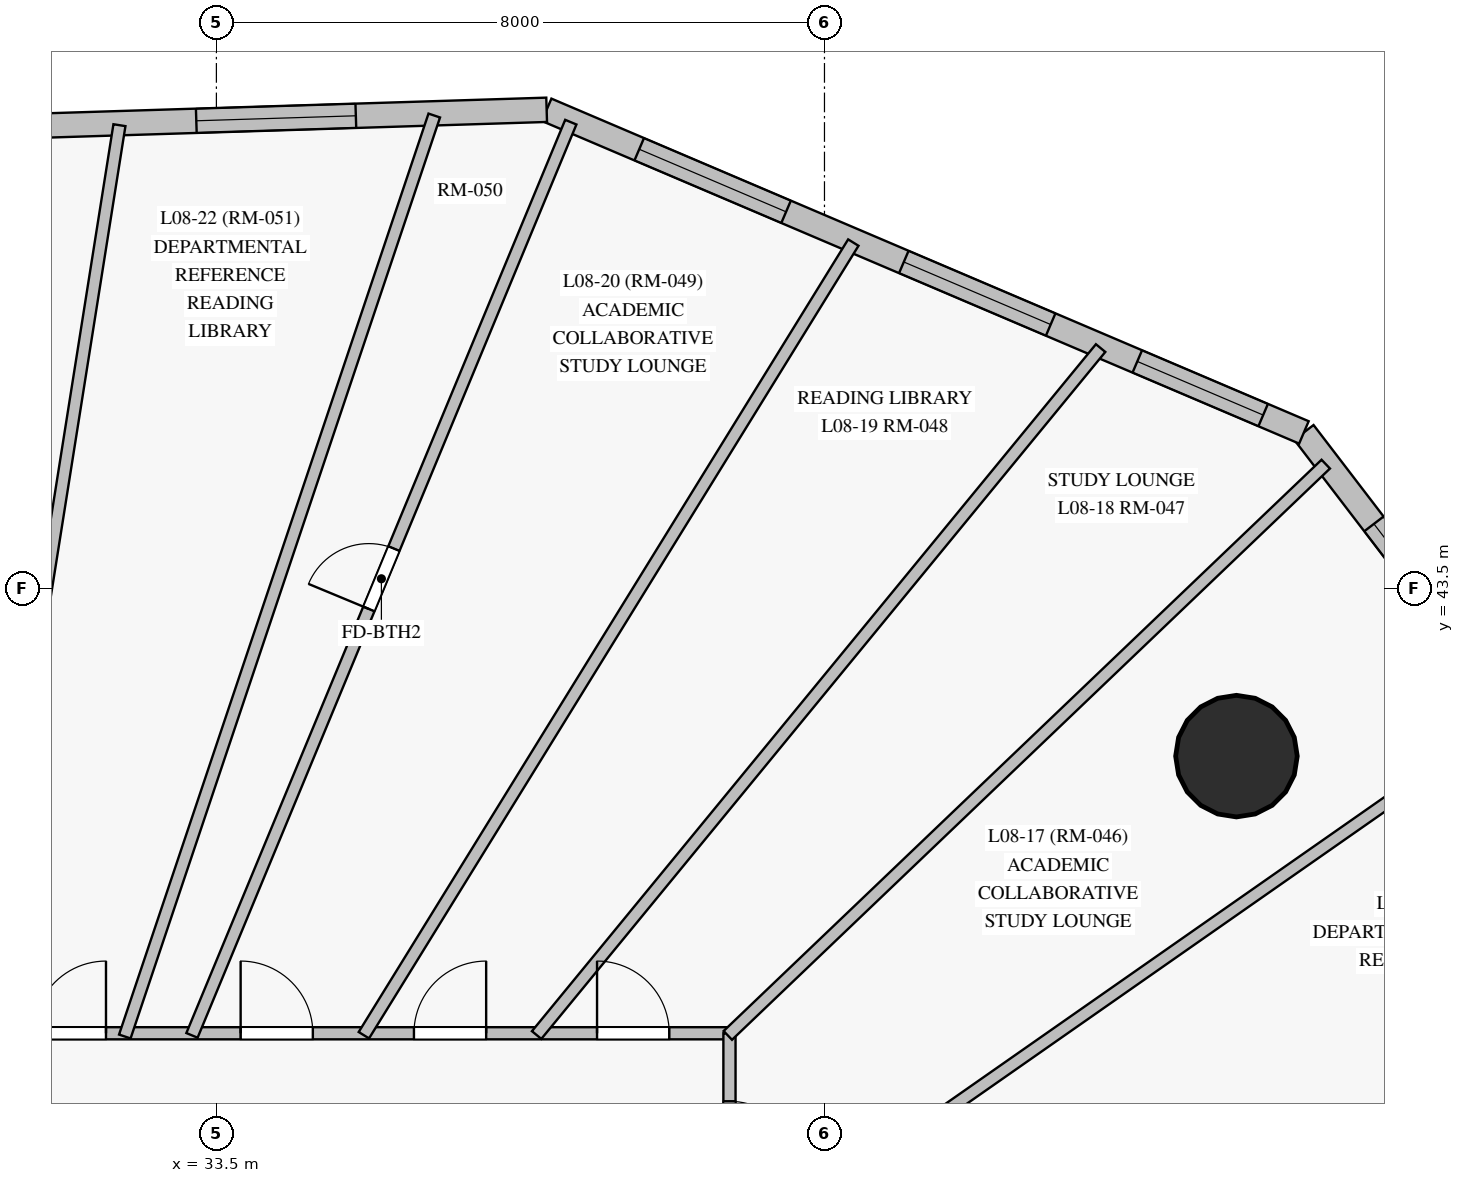
"""IFC4 building model, lengths in metres.
Left out: names, types, materials, properties, quantities, classifications, styles, units other than length and angle.
Written with IfcOpenShell. Run it as: python <this file> out.ifc"""

import sys

from ifc_helpers import new_model, si_unit, direction, frame, frame_2d, origin, origin_with_axes, origin_2d, place, context, subcontext, project, spatial, rectangle, circle, extrude, source, transform, mapped, element, fill, save


model = new_model("IFC4")
c1 = context("Model", 3, precision=1e-05, world=origin(), true_north=direction((0.0, 1.0)))
c2 = subcontext(c1, "Body", "Model", "MODEL_VIEW")
j1 = project(units=[si_unit("LENGTHUNIT", "METRE"), si_unit("PLANEANGLEUNIT", "RADIAN")], contexts=[c1])
p1 = place(None, origin())
s1 = spatial("IfcSite", under=j1, at=p1, CompositionType="ELEMENT")
p2 = place(p1, origin())
s2 = spatial("IfcBuilding", under=s1, at=p2, CompositionType="ELEMENT")
p3 = place(p2, frame((0.0, 0.0, 33.7)))
s3 = spatial("IfcBuildingStorey", under=s2, at=p3, CompositionType="ELEMENT", Elevation=33.7)
m1 = source(origin_with_axes(), c2, "Body", "SweptSolid", [
    extrude(circle(Radius=0.8, at=origin_2d()), origin(), (0.0, 0.0, 1.0), 3.6),
])
p4 = place(p3, frame((46.92, 41.296, 0.0), z_axis=(0.0, 0.0, 1.0), x_axis=(1.0, 0.0, 0.0)))
e1 = element("IfcColumn", 1, at=p4, inside=s3, PredefinedType="COLUMN", context=c2, shape_type="MappedRepresentation", body=[
    mapped(m1, transform((0.0, 0.0, 0.0), scale=1.0)),
])
p5 = place(p3, frame((55.98, 34.879, 0.0), z_axis=(0.0, 0.0, 1.0), x_axis=(-0.607853082848, 0.794049513363, 0.0)))
e2 = element("IfcWall", 2, at=p5, inside=s3, PredefinedType="SOLIDWALL", context=c2, shape_type="SweptSolid", body=[
    extrude(rectangle(XDim=13.445, YDim=0.32, at=frame_2d((6.723, 0.0))), origin(), (0.0, 0.0, 1.0), 3.35),
])
p6 = place(p5, frame((1.679, 0.0, 0.85)))
e3 = element("IfcOpeningElement", 3, at=p6, cuts=e2, PredefinedType="OPENING", context=c2, shape_type="SweptSolid", body=[
    extrude(rectangle(XDim=2.1, YDim=1.95, at=frame_2d((1.05, 0.975))), frame((0.0, 0.17, 0.0), z_axis=(0.0, -1.0, 0.0), x_axis=(1.0, 0.0, 0.0)), (0.0, 0.0, 1.0), 0.34),
])
p7 = place(p5, frame((5.772, 0.0, 0.85)))
e4 = element("IfcOpeningElement", 4, at=p7, cuts=e2, PredefinedType="OPENING", context=c2, shape_type="SweptSolid", body=[
    extrude(rectangle(XDim=2.1, YDim=1.95, at=frame_2d((1.05, 0.975))), frame((0.0, 0.17, 0.0), z_axis=(0.0, -1.0, 0.0), x_axis=(1.0, 0.0, 0.0)), (0.0, 0.0, 1.0), 0.34),
])
p8 = place(p5, frame((9.83, 0.0, 0.85)))
e5 = element("IfcOpeningElement", 5, at=p8, cuts=e2, PredefinedType="OPENING", context=c2, shape_type="SweptSolid", body=[
    extrude(rectangle(XDim=2.1, YDim=1.95, at=frame_2d((1.05, 0.975))), frame((0.0, 0.17, 0.0), z_axis=(0.0, -1.0, 0.0), x_axis=(1.0, 0.0, 0.0)), (0.0, 0.0, 1.0), 0.34),
])
p9 = place(p3, frame((47.807, 45.555, 0.0), z_axis=(0.0, 0.0, 1.0), x_axis=(-0.919989506937, 0.391942989637, 0.0)))
e6 = element("IfcWall", 6, at=p9, inside=s3, PredefinedType="SOLIDWALL", context=c2, shape_type="SweptSolid", body=[
    extrude(rectangle(XDim=10.829, YDim=0.32, at=frame_2d((5.415, 0.0))), origin(), (0.0, 0.0, 1.0), 3.35),
])
p10 = place(p9, frame((0.583, 0.0, 0.85)))
e7 = element("IfcOpeningElement", 7, at=p10, cuts=e6, PredefinedType="OPENING", context=c2, shape_type="SweptSolid", body=[
    extrude(rectangle(XDim=1.8, YDim=1.85, at=frame_2d((0.9, 0.925))), frame((0.0, 0.17, 0.0), z_axis=(0.0, -1.0, 0.0), x_axis=(1.0, 0.0, 0.0)), (0.0, 0.0, 1.0), 0.34),
])
p11 = place(p9, frame((3.621, 0.0, 0.85)))
e8 = element("IfcOpeningElement", 8, at=p11, cuts=e6, PredefinedType="OPENING", context=c2, shape_type="SweptSolid", body=[
    extrude(rectangle(XDim=2.1, YDim=1.95, at=frame_2d((1.05, 0.975))), frame((0.0, 0.17, 0.0), z_axis=(0.0, -1.0, 0.0), x_axis=(1.0, 0.0, 0.0)), (0.0, 0.0, 1.0), 0.34),
])
p12 = place(p9, frame((7.405, 0.0, 0.85)))
e9 = element("IfcOpeningElement", 9, at=p12, cuts=e6, PredefinedType="OPENING", context=c2, shape_type="SweptSolid", body=[
    extrude(rectangle(XDim=2.1, YDim=1.95, at=frame_2d((1.05, 0.975))), frame((0.0, 0.17, 0.0), z_axis=(0.0, -1.0, 0.0), x_axis=(1.0, 0.0, 0.0)), (0.0, 0.0, 1.0), 0.34),
])
p13 = place(p3, frame((37.845, 49.799, 0.0), z_axis=(0.0, 0.0, 1.0), x_axis=(-0.999508801206, -0.031339373191, 0.0)))
e10 = element("IfcWall", 10, at=p13, inside=s3, PredefinedType="SOLIDWALL", context=c2, shape_type="SweptSolid", body=[
    extrude(rectangle(XDim=15.736, YDim=0.32, at=frame_2d((7.868, 0.0))), origin(), (0.0, 0.0, 1.0), 3.35),
])
p14 = place(p13, frame((2.511, 0.0, 0.85)))
e11 = element("IfcOpeningElement", 11, at=p14, cuts=e10, PredefinedType="OPENING", context=c2, shape_type="SweptSolid", body=[
    extrude(rectangle(XDim=2.1, YDim=1.95, at=frame_2d((1.05, 0.975))), frame((0.0, 0.17, 0.0), z_axis=(0.0, -1.0, 0.0), x_axis=(1.0, 0.0, 0.0)), (0.0, 0.0, 1.0), 0.34),
])
p15 = place(p13, frame((7.155, 0.0, 0.85)))
e12 = element("IfcOpeningElement", 12, at=p15, cuts=e10, PredefinedType="OPENING", context=c2, shape_type="SweptSolid", body=[
    extrude(rectangle(XDim=2.1, YDim=1.95, at=frame_2d((1.05, 0.975))), frame((0.0, 0.17, 0.0), z_axis=(0.0, -1.0, 0.0), x_axis=(1.0, 0.0, 0.0)), (0.0, 0.0, 1.0), 0.34),
])
p16 = place(p13, frame((11.572, 0.0, 0.85)))
e13 = element("IfcOpeningElement", 13, at=p16, cuts=e10, PredefinedType="OPENING", context=c2, shape_type="SweptSolid", body=[
    extrude(rectangle(XDim=2.1, YDim=1.95, at=frame_2d((1.05, 0.975))), frame((0.0, 0.17, 0.0), z_axis=(0.0, -1.0, 0.0), x_axis=(1.0, 0.0, 0.0)), (0.0, 0.0, 1.0), 0.34),
])
p17 = place(p3, frame((10.5, 37.65, 0.0), z_axis=(0.0, 0.0, 1.0), x_axis=(1.0, 0.0, 0.0)))
e14 = element("IfcWall", 14, at=p17, inside=s3, PredefinedType="PARTITIONING", context=c2, shape_type="SweptSolid", body=[
    extrude(rectangle(XDim=29.75, YDim=0.16, at=frame_2d((14.875, 0.0))), origin(), (0.0, 0.0, 1.0), 2.75),
])
p18 = place(p17, frame((28.008, 0.0, 0.0)))
e15 = element("IfcOpeningElement", 15, at=p18, cuts=e14, PredefinedType="OPENING", context=c2, shape_type="SweptSolid", body=[
    extrude(rectangle(XDim=0.95, YDim=2.15, at=frame_2d((0.475, 1.075))), frame((0.0, 0.09, 0.0), z_axis=(0.0, -1.0, 0.0), x_axis=(1.0, 0.0, 0.0)), (0.0, 0.0, 1.0), 0.18),
])
p19 = place(p17, frame((25.599, 0.0, 0.0)))
e16 = element("IfcOpeningElement", 16, at=p19, cuts=e14, PredefinedType="OPENING", context=c2, shape_type="SweptSolid", body=[
    extrude(rectangle(XDim=0.95, YDim=2.15, at=frame_2d((0.475, 1.075))), frame((0.0, 0.09, 0.0), z_axis=(0.0, -1.0, 0.0), x_axis=(1.0, 0.0, 0.0)), (0.0, 0.0, 1.0), 0.18),
])
p20 = place(p17, frame((23.319, 0.0, 0.0)))
e17 = element("IfcOpeningElement", 17, at=p20, cuts=e14, PredefinedType="OPENING", context=c2, shape_type="SweptSolid", body=[
    extrude(rectangle(XDim=0.95, YDim=2.15, at=frame_2d((0.475, 1.075))), frame((0.0, 0.09, 0.0), z_axis=(0.0, -1.0, 0.0), x_axis=(1.0, 0.0, 0.0)), (0.0, 0.0, 1.0), 0.18),
])
p21 = place(p17, frame((20.597, 0.0, 0.0)))
e18 = element("IfcOpeningElement", 18, at=p21, cuts=e14, PredefinedType="OPENING", context=c2, shape_type="SweptSolid", body=[
    extrude(rectangle(XDim=0.95, YDim=2.15, at=frame_2d((0.475, 1.075))), frame((0.0, 0.09, 0.0), z_axis=(0.0, -1.0, 0.0), x_axis=(1.0, 0.0, 0.0)), (0.0, 0.0, 1.0), 0.18),
])
p22 = place(p17, frame((18.611, 0.0, 0.0)))
e19 = element("IfcOpeningElement", 19, at=p22, cuts=e14, PredefinedType="OPENING", context=c2, shape_type="SweptSolid", body=[
    extrude(rectangle(XDim=0.95, YDim=2.15, at=frame_2d((0.475, 1.075))), frame((0.0, 0.09, 0.0), z_axis=(0.0, -1.0, 0.0), x_axis=(1.0, 0.0, 0.0)), (0.0, 0.0, 1.0), 0.18),
])
p23 = place(p17, frame((16.123, 0.0, 0.0)))
e20 = element("IfcOpeningElement", 20, at=p23, cuts=e14, PredefinedType="OPENING", context=c2, shape_type="SweptSolid", body=[
    extrude(rectangle(XDim=0.95, YDim=2.15, at=frame_2d((0.475, 1.075))), frame((0.0, 0.09, 0.0), z_axis=(0.0, -1.0, 0.0), x_axis=(1.0, 0.0, 0.0)), (0.0, 0.0, 1.0), 0.18),
])
p24 = place(p17, frame((12.996, 0.0, 0.0)))
e21 = element("IfcOpeningElement", 21, at=p24, cuts=e14, PredefinedType="OPENING", context=c2, shape_type="SweptSolid", body=[
    extrude(rectangle(XDim=0.95, YDim=2.15, at=frame_2d((0.475, 1.075))), frame((0.0, 0.09, 0.0), z_axis=(0.0, -1.0, 0.0), x_axis=(1.0, 0.0, 0.0)), (0.0, 0.0, 1.0), 0.18),
])
p25 = place(p17, frame((10.46, 0.0, 0.0)))
e22 = element("IfcOpeningElement", 22, at=p25, cuts=e14, PredefinedType="OPENING", context=c2, shape_type="SweptSolid", body=[
    extrude(rectangle(XDim=0.95, YDim=2.15, at=frame_2d((0.475, 1.075))), frame((0.0, 0.09, 0.0), z_axis=(0.0, -1.0, 0.0), x_axis=(1.0, 0.0, 0.0)), (0.0, 0.0, 1.0), 0.18),
])
p26 = place(p17, frame((7.876, 0.0, 0.0)))
e23 = element("IfcOpeningElement", 23, at=p26, cuts=e14, PredefinedType="OPENING", context=c2, shape_type="SweptSolid", body=[
    extrude(rectangle(XDim=0.95, YDim=2.15, at=frame_2d((0.475, 1.075))), frame((0.0, 0.09, 0.0), z_axis=(0.0, -1.0, 0.0), x_axis=(1.0, 0.0, 0.0)), (0.0, 0.0, 1.0), 0.18),
])
p27 = place(p17, frame((6.748, 0.0, 0.0)))
e24 = element("IfcOpeningElement", 24, at=p27, cuts=e14, PredefinedType="OPENING", context=c2, shape_type="SweptSolid", body=[
    extrude(rectangle(XDim=0.95, YDim=2.15, at=frame_2d((0.475, 1.075))), frame((0.0, 0.09, 0.0), z_axis=(0.0, -1.0, 0.0), x_axis=(1.0, 0.0, 0.0)), (0.0, 0.0, 1.0), 0.18),
])
p28 = place(p17, frame((5.623, 0.0, 0.0)))
e25 = element("IfcOpeningElement", 25, at=p28, cuts=e14, PredefinedType="OPENING", context=c2, shape_type="SweptSolid", body=[
    extrude(rectangle(XDim=0.95, YDim=2.15, at=frame_2d((0.475, 1.075))), frame((0.0, 0.09, 0.0), z_axis=(0.0, -1.0, 0.0), x_axis=(1.0, 0.0, 0.0)), (0.0, 0.0, 1.0), 0.18),
])
p29 = place(p3, frame((40.25, 37.65, 0.0), z_axis=(0.0, 0.0, 1.0), x_axis=(0.0, -1.0, 0.0)))
e26 = element("IfcWall", 26, at=p29, inside=s3, PredefinedType="PARTITIONING", context=c2, shape_type="SweptSolid", body=[
    extrude(rectangle(XDim=22.3, YDim=0.16, at=frame_2d((11.15, 0.0))), origin(), (0.0, 0.0, 1.0), 2.75),
])
p30 = place(p29, frame((16.25, 0.0, 0.0)))
e27 = element("IfcOpeningElement", 27, at=p30, cuts=e26, PredefinedType="OPENING", context=c2, shape_type="SweptSolid", body=[
    extrude(rectangle(XDim=0.95, YDim=2.15, at=frame_2d((0.475, 1.075))), frame((0.0, 0.09, 0.0), z_axis=(0.0, -1.0, 0.0), x_axis=(1.0, 0.0, 0.0)), (0.0, 0.0, 1.0), 0.18),
])
p31 = place(p29, frame((14.02, 0.0, 0.0)))
e28 = element("IfcOpeningElement", 28, at=p31, cuts=e26, PredefinedType="OPENING", context=c2, shape_type="SweptSolid", body=[
    extrude(rectangle(XDim=0.95, YDim=2.15, at=frame_2d((0.475, 1.075))), frame((0.0, 0.09, 0.0), z_axis=(0.0, -1.0, 0.0), x_axis=(1.0, 0.0, 0.0)), (0.0, 0.0, 1.0), 0.18),
])
p32 = place(p29, frame((11.165, 0.0, 0.0)))
e29 = element("IfcOpeningElement", 29, at=p32, cuts=e26, PredefinedType="OPENING", context=c2, shape_type="SweptSolid", body=[
    extrude(rectangle(XDim=0.95, YDim=2.15, at=frame_2d((0.475, 1.075))), frame((0.0, 0.09, 0.0), z_axis=(0.0, -1.0, 0.0), x_axis=(1.0, 0.0, 0.0)), (0.0, 0.0, 1.0), 0.18),
])
p33 = place(p29, frame((9.341, 0.0, 0.0)))
e30 = element("IfcOpeningElement", 30, at=p33, cuts=e26, PredefinedType="OPENING", context=c2, shape_type="SweptSolid", body=[
    extrude(rectangle(XDim=0.95, YDim=2.15, at=frame_2d((0.475, 1.075))), frame((0.0, 0.09, 0.0), z_axis=(0.0, -1.0, 0.0), x_axis=(1.0, 0.0, 0.0)), (0.0, 0.0, 1.0), 0.18),
])
p34 = place(p29, frame((7.62, 0.0, 0.0)))
e31 = element("IfcOpeningElement", 31, at=p34, cuts=e26, PredefinedType="OPENING", context=c2, shape_type="SweptSolid", body=[
    extrude(rectangle(XDim=0.95, YDim=2.15, at=frame_2d((0.475, 1.075))), frame((0.0, 0.09, 0.0), z_axis=(0.0, -1.0, 0.0), x_axis=(1.0, 0.0, 0.0)), (0.0, 0.0, 1.0), 0.18),
])
p35 = place(p29, frame((5.59, 0.0, 0.0)))
e32 = element("IfcOpeningElement", 32, at=p35, cuts=e26, PredefinedType="OPENING", context=c2, shape_type="SweptSolid", body=[
    extrude(rectangle(XDim=0.95, YDim=2.15, at=frame_2d((0.475, 1.075))), frame((0.0, 0.09, 0.0), z_axis=(0.0, -1.0, 0.0), x_axis=(1.0, 0.0, 0.0)), (0.0, 0.0, 1.0), 0.18),
])
p36 = place(p29, frame((3.591, 0.0, 0.0)))
e33 = element("IfcOpeningElement", 33, at=p36, cuts=e26, PredefinedType="OPENING", context=c2, shape_type="SweptSolid", body=[
    extrude(rectangle(XDim=0.95, YDim=2.15, at=frame_2d((0.475, 1.075))), frame((0.0, 0.09, 0.0), z_axis=(0.0, -1.0, 0.0), x_axis=(1.0, 0.0, 0.0)), (0.0, 0.0, 1.0), 0.18),
])
p37 = place(p29, frame((0.895, 0.0, 0.0)))
e34 = element("IfcOpeningElement", 34, at=p37, cuts=e26, PredefinedType="OPENING", context=c2, shape_type="SweptSolid", body=[
    extrude(rectangle(XDim=0.95, YDim=2.15, at=frame_2d((0.475, 1.075))), frame((0.0, 0.09, 0.0), z_axis=(0.0, -1.0, 0.0), x_axis=(1.0, 0.0, 0.0)), (0.0, 0.0, 1.0), 0.18),
])
p38 = place(p3, frame((40.223, 32.287, 0.0), z_axis=(0.0, 0.0, 1.0), x_axis=(0.894645323944, 0.44677706336, 0.0)))
e35 = element("IfcWall", 35, at=p38, inside=s3, PredefinedType="PARTITIONING", context=c2, shape_type="SweptSolid", body=[
    extrude(rectangle(XDim=14.319, YDim=0.16, at=frame_2d((7.16, 0.0))), origin(), (0.0, 0.0, 1.0), 3.35),
])
p39 = place(p3, frame((33.179, 37.622, 0.0), z_axis=(0.0, 0.0, 1.0), x_axis=(0.383172838405, 0.923676661992, 0.0)))
e36 = element("IfcWall", 36, at=p39, inside=s3, PredefinedType="PARTITIONING", context=c2, shape_type="SweptSolid", body=[
    extrude(rectangle(XDim=13.007, YDim=0.16, at=frame_2d((6.503, 0.0))), origin(), (0.0, 0.0, 1.0), 3.35),
])
p40 = place(p39, frame((6.073, 0.0, 0.0)))
e37 = element("IfcOpeningElement", 37, at=p40, cuts=e36, PredefinedType="OPENING", context=c2, shape_type="SweptSolid", body=[
    extrude(rectangle(XDim=0.86, YDim=2.04, at=frame_2d((0.43, 1.02))), frame((0.0, 0.09, 0.0), z_axis=(0.0, -1.0, 0.0), x_axis=(1.0, 0.0, 0.0)), (0.0, 0.0, 1.0), 0.18),
])
p41 = place(p3, frame((32.295, 37.607, 0.0), z_axis=(0.0, 0.0, 1.0), x_axis=(0.318501732795, 0.947922278569, 0.0)))
e38 = element("IfcWall", 38, at=p41, inside=s3, PredefinedType="PARTITIONING", context=c2, shape_type="SweptSolid", body=[
    extrude(rectangle(XDim=12.782, YDim=0.16, at=frame_2d((6.391, 0.0))), origin(), (0.0, 0.0, 1.0), 3.35),
])
p42 = place(p3, frame((40.225, 34.621, 0.0), z_axis=(0.0, 0.0, 1.0), x_axis=(0.819692125895, 0.572804345956, 0.0)))
e39 = element("IfcWall", 39, at=p42, inside=s3, PredefinedType="PARTITIONING", context=c2, shape_type="SweptSolid", body=[
    extrude(rectangle(XDim=12.654, YDim=0.16, at=frame_2d((6.327, 0.0))), origin(), (0.0, 0.0, 1.0), 3.35),
])
p43 = place(p3, frame((35.44, 37.625, 0.0), z_axis=(0.0, 0.0, 1.0), x_axis=(0.525421629301, 0.850842001468, 0.0)))
e40 = element("IfcWall", 40, at=p43, inside=s3, PredefinedType="PARTITIONING", context=c2, shape_type="SweptSolid", body=[
    extrude(rectangle(XDim=12.256, YDim=0.16, at=frame_2d((6.128, 0.0))), origin(), (0.0, 0.0, 1.0), 3.35),
])
p44 = place(p3, frame((30.325, 37.62, 0.0), z_axis=(0.0, 0.0, 1.0), x_axis=(0.156659374138, 0.987652692243, 0.0)))
e41 = element("IfcWall", 41, at=p44, inside=s3, PredefinedType="PARTITIONING", context=c2, shape_type="SweptSolid", body=[
    extrude(rectangle(XDim=12.126, YDim=0.16, at=frame_2d((6.063, 0.0))), origin(), (0.0, 0.0, 1.0), 3.35),
])
p45 = place(p3, frame((37.713, 37.627, 0.0), z_axis=(0.0, 0.0, 1.0), x_axis=(0.634544387192, 0.772886421593, 0.0)))
e42 = element("IfcWall", 42, at=p45, inside=s3, PredefinedType="PARTITIONING", context=c2, shape_type="SweptSolid", body=[
    extrude(rectangle(XDim=11.693, YDim=0.16, at=frame_2d((5.847, 0.0))), origin(), (0.0, 0.0, 1.0), 3.35),
])
p46 = place(p3, frame((40.228, 37.622, 0.0), z_axis=(0.0, 0.0, 1.0), x_axis=(0.723068149903, 0.690776700964, 0.0)))
e43 = element("IfcWall", 43, at=p46, inside=s3, PredefinedType="PARTITIONING", context=c2, shape_type="SweptSolid", body=[
    extrude(rectangle(XDim=10.88, YDim=0.16, at=frame_2d((5.44, 0.0))), origin(), (0.0, 0.0, 1.0), 3.35),
])
m2 = source(origin_with_axes(), c2, "Body", "SweptSolid", [
    extrude(rectangle(XDim=2.1, YDim=1.95, at=frame_2d((1.05, 0.975))), frame((0.0, 0.03, 0.0), z_axis=(0.0, -1.0, 0.0), x_axis=(1.0, 0.0, 0.0)), (0.0, 0.0, 1.0), 0.06),
])
p47 = place(p8, origin())
e44 = element("IfcWindow", 44, at=p47, inside=s3, PartitioningType="SINGLE_PANEL", PredefinedType="WINDOW", context=c2, shape_type="MappedRepresentation", body=[
    mapped(m2, transform((0.0, 0.0, 0.0), scale=1.0)),
])
fill(e5, e44)
m3 = source(origin_with_axes(), c2, "Body", "SweptSolid", [
    extrude(rectangle(XDim=1.8, YDim=1.85, at=frame_2d((0.9, 0.925))), frame((0.0, 0.03, 0.0), z_axis=(0.0, -1.0, 0.0), x_axis=(1.0, 0.0, 0.0)), (0.0, 0.0, 1.0), 0.06),
])
p48 = place(p10, origin())
e45 = element("IfcWindow", 45, at=p48, inside=s3, PartitioningType="SINGLE_PANEL", PredefinedType="WINDOW", context=c2, shape_type="MappedRepresentation", body=[
    mapped(m3, transform((0.0, 0.0, 0.0), scale=1.0)),
])
fill(e7, e45)
p49 = place(p11, origin())
e46 = element("IfcWindow", 46, at=p49, inside=s3, PartitioningType="SINGLE_PANEL", PredefinedType="WINDOW", context=c2, shape_type="MappedRepresentation", body=[
    mapped(m2, transform((0.0, 0.0, 0.0), scale=1.0)),
])
fill(e8, e46)
p50 = place(p12, origin())
e47 = element("IfcWindow", 47, at=p50, inside=s3, PartitioningType="SINGLE_PANEL", PredefinedType="WINDOW", context=c2, shape_type="MappedRepresentation", body=[
    mapped(m2, transform((0.0, 0.0, 0.0), scale=1.0)),
])
fill(e9, e47)
p51 = place(p14, origin())
e48 = element("IfcWindow", 48, at=p51, inside=s3, PartitioningType="SINGLE_PANEL", PredefinedType="WINDOW", context=c2, shape_type="MappedRepresentation", body=[
    mapped(m2, transform((0.0, 0.0, 0.0), scale=1.0)),
])
fill(e11, e48)
m4 = source(origin_with_axes(), c2, "Body", "SweptSolid", [
    extrude(rectangle(XDim=0.95, YDim=2.15, at=frame_2d((0.475, 1.075))), frame((0.0, 0.025, 0.0), z_axis=(0.0, -1.0, 0.0), x_axis=(1.0, 0.0, 0.0)), (0.0, 0.0, 1.0), 0.05),
])
p52 = place(p37, origin())
e49 = element("IfcDoor", 49, at=p52, inside=s3, OperationType="SINGLE_SWING_RIGHT", PredefinedType="DOOR", context=c2, shape_type="MappedRepresentation", body=[
    mapped(m4, transform((0.0, 0.0, 0.0), scale=1.0)),
])
fill(e34, e49)
p53 = place(p18, origin())
e50 = element("IfcDoor", 50, at=p53, inside=s3, OperationType="SINGLE_SWING_LEFT", PredefinedType="DOOR", context=c2, shape_type="MappedRepresentation", body=[
    mapped(m4, transform((0.0, 0.0, 0.0), scale=1.0)),
])
fill(e15, e50)
p54 = place(p19, origin())
e51 = element("IfcDoor", 51, at=p54, inside=s3, OperationType="SINGLE_SWING_RIGHT", PredefinedType="DOOR", context=c2, shape_type="MappedRepresentation", body=[
    mapped(m4, transform((0.0, 0.0, 0.0), scale=1.0)),
])
fill(e16, e51)
p55 = place(p20, origin())
e52 = element("IfcDoor", 52, at=p55, inside=s3, OperationType="SINGLE_SWING_LEFT", PredefinedType="DOOR", context=c2, shape_type="MappedRepresentation", body=[
    mapped(m4, transform((0.0, 0.0, 0.0), scale=1.0)),
])
fill(e17, e52)
p56 = place(p21, origin())
e53 = element("IfcDoor", 53, at=p56, inside=s3, OperationType="SINGLE_SWING_RIGHT", PredefinedType="DOOR", context=c2, shape_type="MappedRepresentation", body=[
    mapped(m4, transform((0.0, 0.0, 0.0), scale=1.0)),
])
fill(e18, e53)
m5 = source(origin_with_axes(), c2, "Body", "SweptSolid", [
    extrude(rectangle(XDim=0.86, YDim=2.04, at=frame_2d((0.43, 1.02))), frame((0.0, 0.025, 0.0), z_axis=(0.0, -1.0, 0.0), x_axis=(1.0, 0.0, 0.0)), (0.0, 0.0, 1.0), 0.05),
])
p57 = place(p40, origin())
e54 = element("IfcDoor", 54, at=p57, inside=s3, OperationType="SINGLE_SWING_LEFT", PredefinedType="DOOR", context=c2, shape_type="MappedRepresentation", body=[
    mapped(m5, transform((0.0, 0.0, 0.0), scale=1.0)),
])
fill(e37, e54)
save(model, sys.argv[1])
